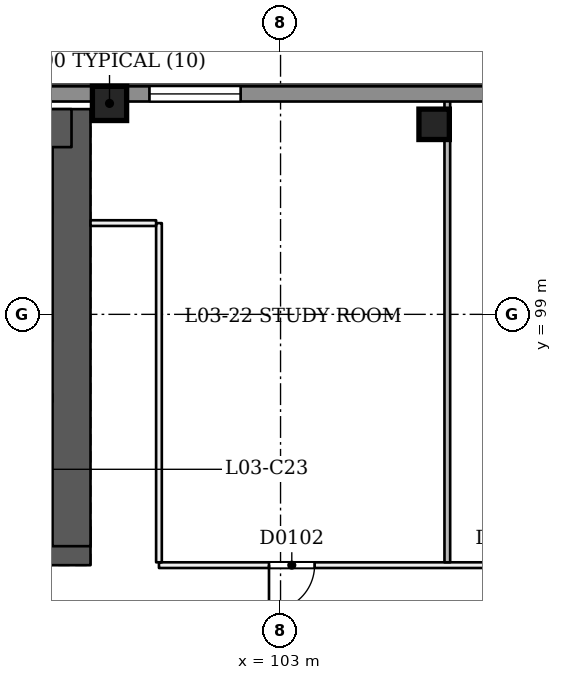
"""IFC4 building model, lengths in metres.
Left out: names, types, materials, properties, quantities, classifications, styles, units other than length and angle.
Written with IfcOpenShell. Run it as: python <this file> out.ifc"""

import sys

from ifc_helpers import new_model, si_unit, direction, frame, frame_2d, origin, origin_2d, place, context, subcontext, project, spatial, rectangle, extrude, element, fill, save


model = new_model("IFC4")
c1 = context("Model", 3, precision=1e-05, world=origin(), true_north=direction((0.0, 1.0)))
c2 = subcontext(c1, "Body", "Model", "MODEL_VIEW")
j1 = project(units=[si_unit("LENGTHUNIT", "METRE"), si_unit("PLANEANGLEUNIT", "RADIAN")], contexts=[c1])
p1 = place(None, origin())
s1 = spatial("IfcSite", under=j1, at=p1, CompositionType="ELEMENT")
p2 = place(p1, origin())
s2 = spatial("IfcBuilding", under=s1, at=p2, CompositionType="ELEMENT")
p3 = place(p2, frame((0.0, 0.0, 18.0)))
s3 = spatial("IfcBuildingStorey", under=s2, at=p3, CompositionType="ELEMENT", Elevation=18.0)
p4 = place(p3, frame((72.5, 92.9, 0.0), z_axis=(0.0, 0.0, 1.0), x_axis=(1.0, 0.0, 0.0)))
e1 = element("IfcWall", 1, at=p4, inside=s3, PredefinedType="SHEAR", context=c2, shape_type="SweptSolid", body=[
    extrude(rectangle(XDim=25.5, YDim=1.0, at=frame_2d((12.75, 0.0))), origin(), (0.0, 0.0, 1.0), 4.5),
])
p5 = place(p4, frame((1.3, 0.0, 0.0)))
e2 = element("IfcOpeningElement", 2, at=p5, cuts=e1, PredefinedType="OPENING", context=c2, shape_type="SweptSolid", body=[
    extrude(rectangle(XDim=1.2, YDim=2.1, at=frame_2d((0.6, 1.05))), frame((0.0, 0.51, 0.0), z_axis=(0.0, -1.0, 0.0), x_axis=(1.0, 0.0, 0.0)), (0.0, 0.0, 1.0), 1.021),
])
p6 = place(p4, frame((3.5, 0.0, 0.0)))
e3 = element("IfcOpeningElement", 3, at=p6, cuts=e1, PredefinedType="OPENING", context=c2, shape_type="SweptSolid", body=[
    extrude(rectangle(XDim=1.2, YDim=2.1, at=frame_2d((0.6, 1.05))), frame((0.0, 0.51, 0.0), z_axis=(0.0, -1.0, 0.0), x_axis=(1.0, 0.0, 0.0)), (0.0, 0.0, 1.0), 1.021),
])
p7 = place(p4, frame((13.5, 0.0, 0.0)))
e4 = element("IfcOpeningElement", 4, at=p7, cuts=e1, PredefinedType="OPENING", context=c2, shape_type="SweptSolid", body=[
    extrude(rectangle(XDim=1.2, YDim=2.1, at=frame_2d((0.6, 1.05))), frame((0.0, 0.51, 0.0), z_axis=(0.0, -1.0, 0.0), x_axis=(1.0, 0.0, 0.0)), (0.0, 0.0, 1.0), 1.021),
])
p8 = place(p4, frame((15.562, 0.0, 0.0)))
e5 = element("IfcOpeningElement", 5, at=p8, cuts=e1, PredefinedType="OPENING", context=c2, shape_type="SweptSolid", body=[
    extrude(rectangle(XDim=1.0, YDim=2.1, at=frame_2d((0.5, 1.05))), frame((0.0, 0.51, 0.0), z_axis=(0.0, -1.0, 0.0), x_axis=(1.0, 0.0, 0.0)), (0.0, 0.0, 1.0), 1.021),
])
p9 = place(p4, frame((17.8, 0.0, 0.0)))
e6 = element("IfcOpeningElement", 6, at=p9, cuts=e1, PredefinedType="OPENING", context=c2, shape_type="SweptSolid", body=[
    extrude(rectangle(XDim=1.0, YDim=2.1, at=frame_2d((0.5, 1.05))), frame((0.0, 0.51, 0.0), z_axis=(0.0, -1.0, 0.0), x_axis=(1.0, 0.0, 0.0)), (0.0, 0.0, 1.0), 1.021),
])
p10 = place(p4, frame((20.35, 0.0, 0.0)))
e7 = element("IfcOpeningElement", 7, at=p10, cuts=e1, PredefinedType="OPENING", context=c2, shape_type="SweptSolid", body=[
    extrude(rectangle(XDim=1.0, YDim=2.1, at=frame_2d((0.5, 1.05))), frame((0.0, 0.51, 0.0), z_axis=(0.0, -1.0, 0.0), x_axis=(1.0, 0.0, 0.0)), (0.0, 0.0, 1.0), 1.021),
])
p11 = place(p4, frame((22.837, 0.0, 0.0)))
e8 = element("IfcOpeningElement", 8, at=p11, cuts=e1, PredefinedType="OPENING", context=c2, shape_type="SweptSolid", body=[
    extrude(rectangle(XDim=1.0, YDim=2.1, at=frame_2d((0.5, 1.05))), frame((0.0, 0.51, 0.0), z_axis=(0.0, -1.0, 0.0), x_axis=(1.0, 0.0, 0.0)), (0.0, 0.0, 1.0), 1.021),
])
p12 = place(p3, frame((97.5, 92.9, 0.0), z_axis=(0.0, 0.0, 1.0), x_axis=(0.0, 1.0, 0.0)))
e9 = element("IfcWall", 9, at=p12, inside=s3, PredefinedType="SHEAR", context=c2, shape_type="SweptSolid", body=[
    extrude(rectangle(XDim=11.5, YDim=1.0, at=frame_2d((5.75, 0.0))), origin(), (0.0, 0.0, 1.0), 4.5),
])
p13 = place(p3, frame((97.5, 103.9, 0.0), z_axis=(0.0, 0.0, 1.0), x_axis=(-1.0, 0.0, 0.0)))
e10 = element("IfcWall", 10, at=p13, inside=s3, PredefinedType="SHEAR", context=c2, shape_type="SweptSolid", body=[
    extrude(rectangle(XDim=25.5, YDim=1.0, at=frame_2d((12.75, 0.0))), origin(), (0.0, 0.0, 1.0), 4.5),
])
p14 = place(p3, frame((98.5, 104.55, 0.0), z_axis=(0.0, 0.0, 1.0), x_axis=(1.0, 0.0, 0.0)))
e11 = element("IfcColumn", 11, at=p14, inside=s3, PredefinedType="COLUMN", context=c2, shape_type="SweptSolid", body=[
    extrude(rectangle(XDim=0.9, YDim=0.9, at=origin_2d()), origin(), (0.0, 0.0, 1.0), 4.5),
])
p15 = place(p3, frame((107.041, 104.0, 0.0), z_axis=(0.0, 0.0, 1.0), x_axis=(1.0, 0.0, 0.0)))
e12 = element("IfcColumn", 12, at=p15, inside=s3, PredefinedType="COLUMN", context=c2, shape_type="SweptSolid", body=[
    extrude(rectangle(XDim=0.8, YDim=0.8, at=origin_2d()), origin(), (0.0, 0.0, 1.0), 4.5),
])
p16 = place(p3, frame((86.747, 47.526, 0.0), z_axis=(0.0, 0.0, 1.0), x_axis=(0.500000085768, 0.866025354266, 0.0)))
e13 = element("IfcWall", 13, at=p16, inside=s3, PredefinedType="PARTITIONING", context=c2, shape_type="SweptSolid", body=[
    extrude(rectangle(XDim=55.365, YDim=0.15, at=frame_2d((27.682, 0.0))), origin(), (0.0, 0.0, 1.0), 3.55),
])
p17 = place(p16, frame((0.97, 0.0, 0.0)))
e14 = element("IfcOpeningElement", 14, at=p17, cuts=e13, PredefinedType="OPENING", context=c2, shape_type="SweptSolid", body=[
    extrude(rectangle(XDim=1.2, YDim=2.1, at=frame_2d((0.6, 1.05))), frame((0.0, 0.085, 0.0), z_axis=(0.0, -1.0, 0.0), x_axis=(1.0, 0.0, 0.0)), (0.0, 0.0, 1.0), 0.171),
])
p18 = place(p16, frame((11.332, 0.0, 0.0)))
e15 = element("IfcOpeningElement", 15, at=p18, cuts=e13, PredefinedType="OPENING", context=c2, shape_type="SweptSolid", body=[
    extrude(rectangle(XDim=1.2, YDim=2.1, at=frame_2d((0.6, 1.05))), frame((0.0, 0.085, 0.0), z_axis=(0.0, -1.0, 0.0), x_axis=(1.0, 0.0, 0.0)), (0.0, 0.0, 1.0), 0.171),
])
p19 = place(p16, frame((22.582, 0.0, 0.0)))
e16 = element("IfcOpeningElement", 16, at=p19, cuts=e13, PredefinedType="OPENING", context=c2, shape_type="SweptSolid", body=[
    extrude(rectangle(XDim=1.2, YDim=2.1, at=frame_2d((0.6, 1.05))), frame((0.0, 0.085, 0.0), z_axis=(0.0, -1.0, 0.0), x_axis=(1.0, 0.0, 0.0)), (0.0, 0.0, 1.0), 0.171),
])
p20 = place(p16, frame((28.365, 0.0, 0.0)))
e17 = element("IfcOpeningElement", 17, at=p20, cuts=e13, PredefinedType="OPENING", context=c2, shape_type="SweptSolid", body=[
    extrude(rectangle(XDim=1.0, YDim=2.1, at=frame_2d((0.5, 1.05))), frame((0.0, 0.085, 0.0), z_axis=(0.0, -1.0, 0.0), x_axis=(1.0, 0.0, 0.0)), (0.0, 0.0, 1.0), 0.171),
])
p21 = place(p16, frame((30.615, 0.0, 0.0)))
e18 = element("IfcOpeningElement", 18, at=p21, cuts=e13, PredefinedType="OPENING", context=c2, shape_type="SweptSolid", body=[
    extrude(rectangle(XDim=1.0, YDim=2.1, at=frame_2d((0.5, 1.05))), frame((0.0, 0.085, 0.0), z_axis=(0.0, -1.0, 0.0), x_axis=(1.0, 0.0, 0.0)), (0.0, 0.0, 1.0), 0.171),
])
p22 = place(p16, frame((38.332, 0.0, 0.0)))
e19 = element("IfcOpeningElement", 19, at=p22, cuts=e13, PredefinedType="OPENING", context=c2, shape_type="SweptSolid", body=[
    extrude(rectangle(XDim=1.2, YDim=2.1, at=frame_2d((0.6, 1.05))), frame((0.0, 0.085, 0.0), z_axis=(0.0, -1.0, 0.0), x_axis=(1.0, 0.0, 0.0)), (0.0, 0.0, 1.0), 0.171),
])
p23 = place(p16, frame((49.582, 0.0, 0.0)))
e20 = element("IfcOpeningElement", 20, at=p23, cuts=e13, PredefinedType="OPENING", context=c2, shape_type="SweptSolid", body=[
    extrude(rectangle(XDim=1.2, YDim=2.1, at=frame_2d((0.6, 1.05))), frame((0.0, 0.085, 0.0), z_axis=(0.0, -1.0, 0.0), x_axis=(1.0, 0.0, 0.0)), (0.0, 0.0, 1.0), 0.171),
])
p24 = place(p3, frame((109.883, 92.401, 0.0), z_axis=(0.0, 0.0, 1.0), x_axis=(-1.0, 0.0, 0.0)))
e21 = element("IfcWall", 21, at=p24, inside=s3, PredefinedType="PARTITIONING", context=c2, shape_type="SweptSolid", body=[
    extrude(rectangle(XDim=10.082, YDim=0.15, at=frame_2d((5.041, 0.0))), origin(), (0.0, 0.0, 1.0), 4.05),
])
p25 = place(p24, frame((5.987, 0.0, 0.0)))
e22 = element("IfcOpeningElement", 22, at=p25, cuts=e21, PredefinedType="OPENING", context=c2, shape_type="SweptSolid", body=[
    extrude(rectangle(XDim=1.2, YDim=2.1, at=frame_2d((0.6, 1.05))), frame((0.0, 0.085, 0.0), z_axis=(0.0, -1.0, 0.0), x_axis=(1.0, 0.0, 0.0)), (0.0, 0.0, 1.0), 0.171),
])
p26 = place(p24, frame((0.303, 0.0, 0.0)))
e23 = element("IfcOpeningElement", 23, at=p26, cuts=e21, PredefinedType="OPENING", context=c2, shape_type="SweptSolid", body=[
    extrude(rectangle(XDim=1.2, YDim=2.1, at=frame_2d((0.6, 1.05))), frame((0.0, 0.085, 0.0), z_axis=(0.0, -1.0, 0.0), x_axis=(1.0, 0.0, 0.0)), (0.0, 0.0, 1.0), 0.171),
])
p27 = place(p3, frame((99.801, 92.476, 0.0), z_axis=(0.0, 0.0, 1.0), x_axis=(0.0, 1.0, 0.0)))
e24 = element("IfcWall", 24, at=p27, inside=s3, PredefinedType="PARTITIONING", context=c2, shape_type="SweptSolid", body=[
    extrude(rectangle(XDim=8.924, YDim=0.15, at=frame_2d((4.462, 0.0))), origin(), (0.0, 0.0, 1.0), 4.05),
])
p28 = place(p3, frame((99.726, 101.4, 0.0), z_axis=(0.0, 0.0, 1.0), x_axis=(-0.999999909973, 0.000424328109, 0.0)))
e25 = element("IfcWall", 25, at=p28, inside=s3, PredefinedType="PARTITIONING", context=c2, shape_type="SweptSolid", body=[
    extrude(rectangle(XDim=1.726, YDim=0.15, at=frame_2d((0.863, 0.0))), origin(), (0.0, 0.0, 1.0), 4.05),
])
p29 = place(p3, frame((107.388, 92.476, 0.0), z_axis=(0.0, 0.0, 1.0), x_axis=(0.0, 1.0, 0.0)))
e26 = element("IfcWall", 26, at=p29, inside=s3, PredefinedType="PARTITIONING", context=c2, shape_type="SweptSolid", body=[
    extrude(rectangle(XDim=12.424, YDim=0.15, at=frame_2d((6.212, 0.0))), origin(), (0.0, 0.0, 1.0), 3.55),
])
p30 = place(p3, frame((53.565, 104.8, 0.0), z_axis=(0.0, 0.0, 1.0), x_axis=(1.0, 0.0, 0.0)))
e27 = element("IfcWall", 27, at=p30, inside=s3, PredefinedType="SOLIDWALL", context=c2, shape_type="SweptSolid", body=[
    extrude(rectangle(XDim=62.871, YDim=0.4, at=frame_2d((31.435, 0.0))), origin(), (0.0, 0.0, 1.0), 3.55),
])
p31 = place(p30, frame((59.452, 0.0, 0.9)))
e28 = element("IfcOpeningElement", 28, at=p31, cuts=e27, PredefinedType="OPENING", context=c2, shape_type="SweptSolid", body=[
    extrude(rectangle(XDim=2.4, YDim=1.5, at=frame_2d((1.2, 0.75))), frame((0.0, 0.21, 0.0), z_axis=(0.0, -1.0, 0.0), x_axis=(1.0, 0.0, 0.0)), (0.0, 0.0, 1.0), 0.421),
])
p32 = place(p30, frame((54.986, 0.0, 0.9)))
e29 = element("IfcOpeningElement", 29, at=p32, cuts=e27, PredefinedType="OPENING", context=c2, shape_type="SweptSolid", body=[
    extrude(rectangle(XDim=2.4, YDim=1.5, at=frame_2d((1.2, 0.75))), frame((0.0, 0.21, 0.0), z_axis=(0.0, -1.0, 0.0), x_axis=(1.0, 0.0, 0.0)), (0.0, 0.0, 1.0), 0.421),
])
p33 = place(p30, frame((45.986, 0.0, 0.9)))
e30 = element("IfcOpeningElement", 30, at=p33, cuts=e27, PredefinedType="OPENING", context=c2, shape_type="SweptSolid", body=[
    extrude(rectangle(XDim=2.4, YDim=1.5, at=frame_2d((1.2, 0.75))), frame((0.0, 0.21, 0.0), z_axis=(0.0, -1.0, 0.0), x_axis=(1.0, 0.0, 0.0)), (0.0, 0.0, 1.0), 0.421),
])
p34 = place(p30, frame((14.486, 0.0, 0.9)))
e31 = element("IfcOpeningElement", 31, at=p34, cuts=e27, PredefinedType="OPENING", context=c2, shape_type="SweptSolid", body=[
    extrude(rectangle(XDim=2.4, YDim=1.5, at=frame_2d((1.2, 0.75))), frame((0.0, 0.21, 0.0), z_axis=(0.0, -1.0, 0.0), x_axis=(1.0, 0.0, 0.0)), (0.0, 0.0, 1.0), 0.421),
])
p35 = place(p30, frame((1.018, 0.0, 0.9)))
e32 = element("IfcOpeningElement", 32, at=p35, cuts=e27, PredefinedType="OPENING", context=c2, shape_type="SweptSolid", body=[
    extrude(rectangle(XDim=2.4, YDim=1.5, at=frame_2d((1.2, 0.75))), frame((0.0, 0.21, 0.0), z_axis=(0.0, -1.0, 0.0), x_axis=(1.0, 0.0, 0.0)), (0.0, 0.0, 1.0), 0.421),
])
p36 = place(p3, frame((121.762, 95.574, 0.0), z_axis=(0.0, 0.0, 1.0), x_axis=(-0.499997306052, -0.866026959131, 0.0)))
e33 = element("IfcWall", 33, at=p36, inside=s3, PredefinedType="SOLIDWALL", context=c2, shape_type="SweptSolid", body=[
    extrude(rectangle(XDim=62.87, YDim=0.4, at=frame_2d((31.435, 0.0))), origin(), (0.0, 0.0, 1.0), 3.55),
])
p37 = place(p36, frame((59.452, 0.0, 0.9)))
e34 = element("IfcOpeningElement", 34, at=p37, cuts=e33, PredefinedType="OPENING", context=c2, shape_type="SweptSolid", body=[
    extrude(rectangle(XDim=2.4, YDim=1.5, at=frame_2d((1.2, 0.75))), frame((0.0, 0.21, 0.0), z_axis=(0.0, -1.0, 0.0), x_axis=(1.0, 0.0, 0.0)), (0.0, 0.0, 1.0), 0.421),
])
p38 = place(p36, frame((54.986, 0.0, 0.9)))
e35 = element("IfcOpeningElement", 35, at=p38, cuts=e33, PredefinedType="OPENING", context=c2, shape_type="SweptSolid", body=[
    extrude(rectangle(XDim=2.4, YDim=1.5, at=frame_2d((1.2, 0.75))), frame((0.0, 0.21, 0.0), z_axis=(0.0, -1.0, 0.0), x_axis=(1.0, 0.0, 0.0)), (0.0, 0.0, 1.0), 0.421),
])
p39 = place(p36, frame((50.486, 0.0, 0.9)))
e36 = element("IfcOpeningElement", 36, at=p39, cuts=e33, PredefinedType="OPENING", context=c2, shape_type="SweptSolid", body=[
    extrude(rectangle(XDim=2.4, YDim=1.5, at=frame_2d((1.2, 0.75))), frame((0.0, 0.21, 0.0), z_axis=(0.0, -1.0, 0.0), x_axis=(1.0, 0.0, 0.0)), (0.0, 0.0, 1.0), 0.421),
])
p40 = place(p36, frame((45.986, 0.0, 0.9)))
e37 = element("IfcOpeningElement", 37, at=p40, cuts=e33, PredefinedType="OPENING", context=c2, shape_type="SweptSolid", body=[
    extrude(rectangle(XDim=2.4, YDim=1.5, at=frame_2d((1.2, 0.75))), frame((0.0, 0.21, 0.0), z_axis=(0.0, -1.0, 0.0), x_axis=(1.0, 0.0, 0.0)), (0.0, 0.0, 1.0), 0.421),
])
p41 = place(p36, frame((41.486, 0.0, 0.9)))
e38 = element("IfcOpeningElement", 38, at=p41, cuts=e33, PredefinedType="OPENING", context=c2, shape_type="SweptSolid", body=[
    extrude(rectangle(XDim=2.4, YDim=1.5, at=frame_2d((1.2, 0.75))), frame((0.0, 0.21, 0.0), z_axis=(0.0, -1.0, 0.0), x_axis=(1.0, 0.0, 0.0)), (0.0, 0.0, 1.0), 0.421),
])
p42 = place(p36, frame((36.986, 0.0, 0.9)))
e39 = element("IfcOpeningElement", 39, at=p42, cuts=e33, PredefinedType="OPENING", context=c2, shape_type="SweptSolid", body=[
    extrude(rectangle(XDim=2.4, YDim=1.5, at=frame_2d((1.2, 0.75))), frame((0.0, 0.21, 0.0), z_axis=(0.0, -1.0, 0.0), x_axis=(1.0, 0.0, 0.0)), (0.0, 0.0, 1.0), 0.421),
])
p43 = place(p36, frame((23.486, 0.0, 0.9)))
e40 = element("IfcOpeningElement", 40, at=p43, cuts=e33, PredefinedType="OPENING", context=c2, shape_type="SweptSolid", body=[
    extrude(rectangle(XDim=2.4, YDim=1.5, at=frame_2d((1.2, 0.75))), frame((0.0, 0.21, 0.0), z_axis=(0.0, -1.0, 0.0), x_axis=(1.0, 0.0, 0.0)), (0.0, 0.0, 1.0), 0.421),
])
p44 = place(p36, frame((18.986, 0.0, 0.9)))
e41 = element("IfcOpeningElement", 41, at=p44, cuts=e33, PredefinedType="OPENING", context=c2, shape_type="SweptSolid", body=[
    extrude(rectangle(XDim=2.4, YDim=1.5, at=frame_2d((1.2, 0.75))), frame((0.0, 0.21, 0.0), z_axis=(0.0, -1.0, 0.0), x_axis=(1.0, 0.0, 0.0)), (0.0, 0.0, 1.0), 0.421),
])
p45 = place(p36, frame((14.486, 0.0, 0.9)))
e42 = element("IfcOpeningElement", 42, at=p45, cuts=e33, PredefinedType="OPENING", context=c2, shape_type="SweptSolid", body=[
    extrude(rectangle(XDim=2.4, YDim=1.5, at=frame_2d((1.2, 0.75))), frame((0.0, 0.21, 0.0), z_axis=(0.0, -1.0, 0.0), x_axis=(1.0, 0.0, 0.0)), (0.0, 0.0, 1.0), 0.421),
])
p46 = place(p36, frame((5.486, 0.0, 0.9)))
e43 = element("IfcOpeningElement", 43, at=p46, cuts=e33, PredefinedType="OPENING", context=c2, shape_type="SweptSolid", body=[
    extrude(rectangle(XDim=2.4, YDim=1.5, at=frame_2d((1.2, 0.75))), frame((0.0, 0.21, 0.0), z_axis=(0.0, -1.0, 0.0), x_axis=(1.0, 0.0, 0.0)), (0.0, 0.0, 1.0), 0.421),
])
p47 = place(p36, frame((1.018, 0.0, 0.9)))
e44 = element("IfcOpeningElement", 44, at=p47, cuts=e33, PredefinedType="OPENING", context=c2, shape_type="SweptSolid", body=[
    extrude(rectangle(XDim=2.4, YDim=1.5, at=frame_2d((1.2, 0.75))), frame((0.0, 0.21, 0.0), z_axis=(0.0, -1.0, 0.0), x_axis=(1.0, 0.0, 0.0)), (0.0, 0.0, 1.0), 0.421),
])
p48 = place(p25, origin())
e45 = element("IfcDoor", 45, at=p48, inside=s3, OperationType="SINGLE_SWING_RIGHT", PredefinedType="NOTDEFINED", context=c2, shape_type="SweptSolid", body=[
    extrude(rectangle(XDim=1.2, YDim=2.1, at=frame_2d((0.6, 1.05))), frame((0.0, 0.025, 0.0), z_axis=(0.0, -1.0, 0.0), x_axis=(1.0, 0.0, 0.0)), (0.0, 0.0, 1.0), 0.05),
])
fill(e22, e45)
p49 = place(p33, origin())
e46 = element("IfcWindow", 46, at=p49, inside=s3, PartitioningType="SINGLE_PANEL", PredefinedType="WINDOW", context=c2, shape_type="SweptSolid", body=[
    extrude(rectangle(XDim=2.4, YDim=1.5, at=frame_2d((1.2, 0.75))), frame((0.0, 0.03, 0.0), z_axis=(0.0, -1.0, 0.0), x_axis=(1.0, 0.0, 0.0)), (0.0, 0.0, 1.0), 0.06),
])
fill(e30, e46)
save(model, sys.argv[1])
